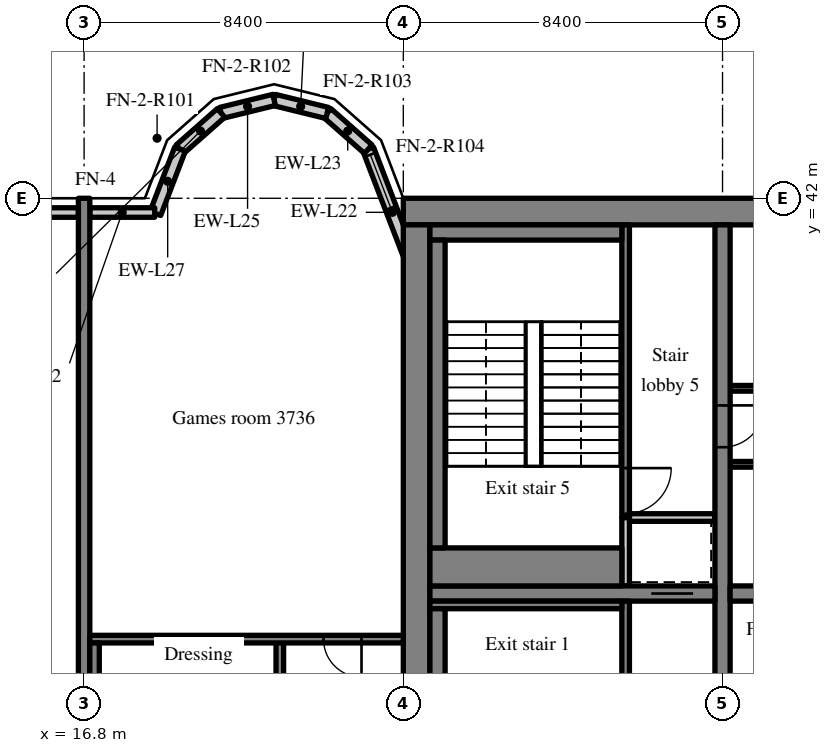
"""IFC4 building model, lengths in metres.
Left out: names, types, materials, properties, quantities, classifications, styles, units other than length and angle.
Written with IfcOpenShell. Run it as: python <this file> out.ifc"""

import sys

from ifc_helpers import new_model, si_unit, direction, frame, frame_2d, origin, place, context, subcontext, project, spatial, rectangle, extrude, source, transform, mapped, element, fill, save


model = new_model("IFC4")
c1 = context("Model", 3, precision=1e-05, world=origin(), true_north=direction((0.0, 1.0)))
c2 = subcontext(c1, "Body", "Model", "MODEL_VIEW")
j1 = project(units=[si_unit("LENGTHUNIT", "METRE"), si_unit("PLANEANGLEUNIT", "RADIAN")], contexts=[c1])
p1 = place(None, origin())
s1 = spatial("IfcSite", under=j1, at=p1, CompositionType="ELEMENT")
p2 = place(p1, origin())
s2 = spatial("IfcBuilding", under=s1, at=p2, CompositionType="ELEMENT")
p3 = place(p2, frame((0.0, 0.0, 155.4)))
s3 = spatial("IfcBuildingStorey", under=s2, at=p3, CompositionType="ELEMENT", Elevation=155.4)
m1 = source(origin(), c2, "Body", "SweptSolid", [
    extrude(rectangle(XDim=50.4, YDim=0.7, at=frame_2d((25.2, 0.0))), origin(), (0.0, 0.0, 1.0), 3.52),
])
p4 = place(p3, frame((25.2, 41.65, 0.0), z_axis=(0.0, 0.0, 1.0), x_axis=(1.0, 0.0, 0.0)))
e1 = element("IfcWall", 1, at=p4, inside=s3, PredefinedType="SHEAR", context=c2, shape_type="MappedRepresentation", body=[
    mapped(m1, transform((0.0, 0.0, 0.0), scale=1.0)),
])
m2 = source(origin(), c2, "Body", "SweptSolid", [
    extrude(rectangle(XDim=18.6, YDim=0.7, at=frame_2d((9.3, 0.0))), origin(), (0.0, 0.0, 1.0), 3.52),
])
p5 = place(p3, frame((25.55, 22.7, 0.0), z_axis=(0.0, 0.0, 1.0), x_axis=(0.0, 1.0, 0.0)))
e2 = element("IfcWall", 2, at=p5, inside=s3, PredefinedType="SHEAR", context=c2, shape_type="MappedRepresentation", body=[
    mapped(m2, transform((0.0, 0.0, 0.0), scale=1.0)),
])
m3 = source(origin(), c2, "Body", "SweptSolid", [
    extrude(rectangle(XDim=18.6, YDim=0.4, at=frame_2d((9.3, 0.0))), origin(), (0.0, 0.0, 1.0), 3.52),
])
p6 = place(p3, frame((33.6, 22.7, 0.0), z_axis=(0.0, 0.0, 1.0), x_axis=(0.0, 1.0, 0.0)))
e3 = element("IfcWall", 3, at=p6, inside=s3, PredefinedType="SHEAR", context=c2, shape_type="MappedRepresentation", body=[
    mapped(m3, transform((0.0, 0.0, 0.0), scale=1.0)),
])
m4 = source(origin(), c2, "Body", "SweptSolid", [
    extrude(rectangle(XDim=1.1, YDim=2.1, at=frame_2d((0.55, 1.05))), frame((0.0, 0.21, 0.0), z_axis=(0.0, -1.0, 0.0), x_axis=(1.0, 0.0, 0.0)), (0.0, 0.0, 1.0), 0.42),
])
p7 = place(p6, frame((12.75, 0.0, 0.0)))
e4 = element("IfcOpeningElement", 4, at=p7, cuts=e3, PredefinedType="OPENING", context=c2, shape_type="MappedRepresentation", body=[
    mapped(m4, transform((0.0, 0.0, 0.0), scale=1.0)),
])
m5 = source(origin(), c2, "Body", "SweptSolid", [
    extrude(rectangle(XDim=7.5, YDim=0.4, at=frame_2d((3.75, 0.0))), origin(), (0.0, 0.0, 1.0), 3.52),
])
p8 = place(p3, frame((25.9, 31.6, 0.0), z_axis=(0.0, 0.0, 1.0), x_axis=(1.0, 0.0, 0.0)))
e5 = element("IfcWall", 5, at=p8, inside=s3, PredefinedType="SHEAR", context=c2, shape_type="MappedRepresentation", body=[
    mapped(m5, transform((0.0, 0.0, 0.0), scale=1.0)),
])
p9 = place(p8, frame((5.825, 0.0, 0.0)))
e6 = element("IfcOpeningElement", 6, at=p9, cuts=e5, PredefinedType="OPENING", context=c2, shape_type="MappedRepresentation", body=[
    mapped(m4, transform((0.0, 0.0, 0.0), scale=1.0)),
])
m6 = source(origin(), c2, "Body", "SweptSolid", [
    extrude(rectangle(XDim=16.4, YDim=0.4, at=frame_2d((8.2, 0.0))), origin(), (0.0, 0.0, 1.0), 3.52),
])
p10 = place(p3, frame((33.8, 31.6, 0.0), z_axis=(0.0, 0.0, 1.0), x_axis=(1.0, 0.0, 0.0)))
e7 = element("IfcWall", 7, at=p10, inside=s3, PredefinedType="SHEAR", context=c2, shape_type="MappedRepresentation", body=[
    mapped(m6, transform((0.0, 0.0, 0.0), scale=1.0)),
])
m7 = source(origin(), c2, "Body", "SweptSolid", [
    extrude(rectangle(XDim=1.0, YDim=2.1, at=frame_2d((0.5, 1.05))), frame((0.0, 0.21, 0.0), z_axis=(0.0, -1.0, 0.0), x_axis=(1.0, 0.0, 0.0)), (0.0, 0.0, 1.0), 0.42),
])
p11 = place(p10, frame((14.8, 0.0, 0.0)))
e8 = element("IfcOpeningElement", 8, at=p11, cuts=e7, PredefinedType="OPENING", context=c2, shape_type="MappedRepresentation", body=[
    mapped(m7, transform((0.0, 0.0, 0.0), scale=1.0)),
])
m8 = source(origin(), c2, "Body", "SweptSolid", [
    extrude(rectangle(XDim=20.0, YDim=0.3, at=frame_2d((10.0, 0.0))), origin(), (0.0, 0.0, 1.0), 3.52),
])
p12 = place(p3, frame((16.8, 22.0, 0.0), z_axis=(0.0, 0.0, 1.0), x_axis=(0.0, 1.0, 0.0)))
e9 = element("IfcWall", 9, at=p12, inside=s3, PredefinedType="SHEAR", context=c2, shape_type="MappedRepresentation", body=[
    mapped(m8, transform((0.0, 0.0, 0.0), scale=1.0)),
])
m9 = source(origin(), c2, "Body", "SweptSolid", [
    extrude(rectangle(XDim=3.559, YDim=0.3, at=frame_2d((1.78, 0.0))), origin(), (0.0, 0.0, 1.0), 3.52),
])
p13 = place(p3, frame((25.55, 39.969, 0.0), z_axis=(0.0, 0.0, 1.0), x_axis=(-0.35779745313, 0.933799219604, 0.0)))
e10 = element("IfcWall", 10, at=p13, inside=s3, PredefinedType="SOLIDWALL", context=c2, shape_type="MappedRepresentation", body=[
    mapped(m9, transform((0.0, 0.0, 0.0), scale=1.0)),
])
m10 = source(origin(), c2, "Body", "SweptSolid", [
    extrude(rectangle(XDim=1.5, YDim=2.0, at=frame_2d((0.75, 1.0))), frame((0.0, 0.16, 0.0), z_axis=(0.0, -1.0, 0.0), x_axis=(1.0, 0.0, 0.0)), (0.0, 0.0, 1.0), 0.32),
])
p14 = place(p13, frame((1.903, 0.0, 0.9)))
e11 = element("IfcOpeningElement", 11, at=p14, cuts=e10, PredefinedType="OPENING", context=c2, shape_type="MappedRepresentation", body=[
    mapped(m10, transform((0.0, 0.0, 0.0), scale=1.0)),
])
m11 = source(origin(), c2, "Body", "SweptSolid", [
    extrude(rectangle(XDim=1.44, YDim=0.3, at=frame_2d((0.72, 0.0))), origin(), (0.0, 0.0, 1.0), 3.52),
])
p15 = place(p3, frame((24.277, 43.292, 0.0), z_axis=(0.0, 0.0, 1.0), x_axis=(-0.749649827867, 0.661834673902, 0.0)))
e12 = element("IfcWall", 12, at=p15, inside=s3, PredefinedType="SOLIDWALL", context=c2, shape_type="MappedRepresentation", body=[
    mapped(m11, transform((0.0, 0.0, 0.0), scale=1.0)),
])
m12 = source(origin(), c2, "Body", "SweptSolid", [
    extrude(rectangle(XDim=1.438, YDim=0.3, at=frame_2d((0.719, 0.0))), origin(), (0.0, 0.0, 1.0), 3.52),
])
p16 = place(p3, frame((23.197, 44.245, 0.0), z_axis=(0.0, 0.0, 1.0), x_axis=(-0.971152283879, 0.238460146601, 0.0)))
e13 = element("IfcWall", 13, at=p16, inside=s3, PredefinedType="SOLIDWALL", context=c2, shape_type="MappedRepresentation", body=[
    mapped(m12, transform((0.0, 0.0, 0.0), scale=1.0)),
])
m13 = source(origin(), c2, "Body", "SweptSolid", [
    extrude(rectangle(XDim=1.439, YDim=0.3, at=frame_2d((0.719, 0.0))), origin(), (0.0, 0.0, 1.0), 3.52),
])
p17 = place(p3, frame((21.8, 44.588, 0.0), z_axis=(0.0, 0.0, 1.0), x_axis=(-0.971161932466, -0.238420848351, 0.0)))
e14 = element("IfcWall", 14, at=p17, inside=s3, PredefinedType="SOLIDWALL", context=c2, shape_type="MappedRepresentation", body=[
    mapped(m13, transform((0.0, 0.0, 0.0), scale=1.0)),
])
m14 = source(origin(), c2, "Body", "SweptSolid", [
    extrude(rectangle(XDim=1.44, YDim=0.3, at=frame_2d((0.72, 0.0))), origin(), (0.0, 0.0, 1.0), 3.52),
])
p18 = place(p3, frame((20.403, 44.245, 0.0), z_axis=(0.0, 0.0, 1.0), x_axis=(-0.74957555648, -0.661918790432, 0.0)))
e15 = element("IfcWall", 15, at=p18, inside=s3, PredefinedType="SOLIDWALL", context=c2, shape_type="MappedRepresentation", body=[
    mapped(m14, transform((0.0, 0.0, 0.0), scale=1.0)),
])
m15 = source(origin(), c2, "Body", "SweptSolid", [
    extrude(rectangle(XDim=1.812, YDim=0.3, at=frame_2d((0.906, 0.0))), origin(), (0.0, 0.0, 1.0), 3.52),
])
p19 = place(p3, frame((19.323, 43.292, 0.0), z_axis=(0.0, 0.0, 1.0), x_axis=(-0.357877270961, -0.93376863244, 0.0)))
e16 = element("IfcWall", 16, at=p19, inside=s3, PredefinedType="SOLIDWALL", context=c2, shape_type="MappedRepresentation", body=[
    mapped(m15, transform((0.0, 0.0, 0.0), scale=1.0)),
])
m16 = source(origin(), c2, "Body", "SweptSolid", [
    extrude(rectangle(XDim=4.094, YDim=0.25, at=frame_2d((2.047, 0.0))), origin(), (0.0, 0.0, 1.0), 2.87),
])
p20 = place(p3, frame((16.65, 41.625, 0.0), z_axis=(0.0, 0.0, 1.0), x_axis=(-1.0, 0.0, 0.0)))
e17 = element("IfcWall", 17, at=p20, inside=s3, PredefinedType="SOLIDWALL", context=c2, shape_type="MappedRepresentation", body=[
    mapped(m16, transform((0.0, 0.0, 0.0), scale=1.0)),
])
m17 = source(origin(), c2, "Body", "SweptSolid", [
    extrude(rectangle(XDim=1.5, YDim=1.5, at=frame_2d((0.75, 0.75))), frame((0.0, 0.135, 0.0), z_axis=(0.0, -1.0, 0.0), x_axis=(1.0, 0.0, 0.0)), (0.0, 0.0, 1.0), 0.27),
])
p21 = place(p20, frame((1.297, 0.0, 0.9)))
e18 = element("IfcOpeningElement", 18, at=p21, cuts=e17, PredefinedType="OPENING", context=c2, shape_type="MappedRepresentation", body=[
    mapped(m17, transform((0.0, 0.0, 0.0), scale=1.0)),
])
m18 = source(origin(), c2, "Body", "SweptSolid", [
    extrude(rectangle(XDim=1.708, YDim=0.25, at=frame_2d((0.854, 0.0))), origin(), (0.0, 0.0, 1.0), 2.87),
])
p22 = place(p3, frame((18.658, 41.625, 0.0), z_axis=(0.0, 0.0, 1.0), x_axis=(-1.0, 0.0, 0.0)))
e19 = element("IfcWall", 19, at=p22, inside=s3, PredefinedType="SOLIDWALL", context=c2, shape_type="MappedRepresentation", body=[
    mapped(m18, transform((0.0, 0.0, 0.0), scale=1.0)),
])
m19 = source(origin(), c2, "Body", "SweptSolid", [
    extrude(rectangle(XDim=14.2, YDim=0.15, at=frame_2d((7.1, 0.0))), origin(), (0.0, 0.0, 1.0), 3.52),
])
p23 = place(p3, frame((33.8, 35.0, 0.0), z_axis=(0.0, 0.0, 1.0), x_axis=(1.0, 0.0, 0.0)))
e20 = element("IfcWall", 20, at=p23, inside=s3, PredefinedType="PARTITIONING", context=c2, shape_type="MappedRepresentation", body=[
    mapped(m19, transform((0.0, 0.0, 0.0), scale=1.0)),
])
m20 = source(origin(), c2, "Body", "SweptSolid", [
    extrude(rectangle(XDim=0.9, YDim=2.1, at=frame_2d((0.45, 1.05))), frame((0.0, 0.085, 0.0), z_axis=(0.0, -1.0, 0.0), x_axis=(1.0, 0.0, 0.0)), (0.0, 0.0, 1.0), 0.17),
])
p24 = place(p23, frame((6.612, 0.0, 0.0)))
e21 = element("IfcOpeningElement", 21, at=p24, cuts=e20, PredefinedType="OPENING", context=c2, shape_type="MappedRepresentation", body=[
    mapped(m20, transform((0.0, 0.0, 0.0), scale=1.0)),
])
m21 = source(origin(), c2, "Body", "SweptSolid", [
    extrude(rectangle(XDim=16.4, YDim=0.15, at=frame_2d((8.2, 0.0))), origin(), (0.0, 0.0, 1.0), 3.52),
])
p25 = place(p3, frame((33.8, 37.0, 0.0), z_axis=(0.0, 0.0, 1.0), x_axis=(1.0, 0.0, 0.0)))
e22 = element("IfcWall", 22, at=p25, inside=s3, PredefinedType="PARTITIONING", context=c2, shape_type="MappedRepresentation", body=[
    mapped(m21, transform((0.0, 0.0, 0.0), scale=1.0)),
])
p26 = place(p25, frame((0.78, 0.0, 0.0)))
e23 = element("IfcOpeningElement", 23, at=p26, cuts=e22, PredefinedType="OPENING", context=c2, shape_type="MappedRepresentation", body=[
    mapped(m20, transform((0.0, 0.0, 0.0), scale=1.0)),
])
p27 = place(p25, frame((3.65, 0.0, 0.0)))
e24 = element("IfcOpeningElement", 24, at=p27, cuts=e22, PredefinedType="OPENING", context=c2, shape_type="MappedRepresentation", body=[
    mapped(m20, transform((0.0, 0.0, 0.0), scale=1.0)),
])
p28 = place(p25, frame((9.39, 0.0, 0.0)))
e25 = element("IfcOpeningElement", 25, at=p28, cuts=e22, PredefinedType="OPENING", context=c2, shape_type="MappedRepresentation", body=[
    mapped(m20, transform((0.0, 0.0, 0.0), scale=1.0)),
])
p29 = place(p25, frame((14.72, 0.0, 0.0)))
e26 = element("IfcOpeningElement", 26, at=p29, cuts=e22, PredefinedType="OPENING", context=c2, shape_type="MappedRepresentation", body=[
    mapped(m20, transform((0.0, 0.0, 0.0), scale=1.0)),
])
m22 = source(origin(), c2, "Body", "SweptSolid", [
    extrude(rectangle(XDim=8.7, YDim=0.2, at=frame_2d((4.35, 0.0))), origin(), (0.0, 0.0, 1.0), 3.52),
])
p30 = place(p3, frame((31.05, 22.7, 0.0), z_axis=(0.0, 0.0, 1.0), x_axis=(0.0, 1.0, 0.0)))
e27 = element("IfcWall", 27, at=p30, inside=s3, PredefinedType="SOLIDWALL", context=c2, shape_type="MappedRepresentation", body=[
    mapped(m22, transform((0.0, 0.0, 0.0), scale=1.0)),
])
m23 = source(origin(), c2, "Body", "SweptSolid", [
    extrude(rectangle(XDim=1.2, YDim=2.1, at=frame_2d((0.6, 1.05))), frame((0.0, 0.11, 0.0), z_axis=(0.0, -1.0, 0.0), x_axis=(1.0, 0.0, 0.0)), (0.0, 0.0, 1.0), 0.22),
])
p31 = place(p30, frame((0.9, 0.0, 0.0)))
e28 = element("IfcOpeningElement", 28, at=p31, cuts=e27, PredefinedType="OPENING", context=c2, shape_type="MappedRepresentation", body=[
    mapped(m23, transform((0.0, 0.0, 0.0), scale=1.0)),
])
m24 = source(origin(), c2, "Body", "SweptSolid", [
    extrude(rectangle(XDim=1.8, YDim=0.2, at=frame_2d((0.9, 0.0))), origin(), (0.0, 0.0, 1.0), 3.52),
])
p32 = place(p3, frame((31.05, 31.8, 0.0), z_axis=(0.0, 0.0, 1.0), x_axis=(0.0, 1.0, 0.0)))
e29 = element("IfcWall", 29, at=p32, inside=s3, PredefinedType="SOLIDWALL", context=c2, shape_type="MappedRepresentation", body=[
    mapped(m24, transform((0.0, 0.0, 0.0), scale=1.0)),
])
m25 = source(origin(), c2, "Body", "SweptSolid", [
    extrude(rectangle(XDim=2.25, YDim=0.2, at=frame_2d((1.125, 0.0))), origin(), (0.0, 0.0, 1.0), 3.52),
])
p33 = place(p3, frame((31.15, 33.6, 0.0), z_axis=(0.0, 0.0, 1.0), x_axis=(1.0, 0.0, 0.0)))
e30 = element("IfcWall", 30, at=p33, inside=s3, PredefinedType="SOLIDWALL", context=c2, shape_type="MappedRepresentation", body=[
    mapped(m25, transform((0.0, 0.0, 0.0), scale=1.0)),
])
m26 = source(origin(), c2, "Body", "SweptSolid", [
    extrude(rectangle(XDim=7.7, YDim=0.2, at=frame_2d((3.85, 0.0))), origin(), (0.0, 0.0, 1.0), 3.52),
])
p34 = place(p3, frame((31.05, 33.6, 0.0), z_axis=(0.0, 0.0, 1.0), x_axis=(0.0, 1.0, 0.0)))
e31 = element("IfcWall", 31, at=p34, inside=s3, PredefinedType="SOLIDWALL", context=c2, shape_type="MappedRepresentation", body=[
    mapped(m26, transform((0.0, 0.0, 0.0), scale=1.0)),
])
p35 = place(p34, frame((0.1, 0.0, 0.0)))
e32 = element("IfcOpeningElement", 32, at=p35, cuts=e31, PredefinedType="OPENING", context=c2, shape_type="MappedRepresentation", body=[
    mapped(m23, transform((0.0, 0.0, 0.0), scale=1.0)),
])
m27 = source(origin(), c2, "Body", "SweptSolid", [
    extrude(rectangle(XDim=8.3, YDim=0.2, at=frame_2d((4.15, 0.0))), origin(), (0.0, 0.0, 1.0), 3.52),
])
p36 = place(p3, frame((21.95, 22.1, 0.0), z_axis=(0.0, 0.0, 1.0), x_axis=(0.0, 1.0, 0.0)))
e33 = element("IfcWall", 33, at=p36, inside=s3, PredefinedType="SOLIDWALL", context=c2, shape_type="MappedRepresentation", body=[
    mapped(m27, transform((0.0, 0.0, 0.0), scale=1.0)),
])
p37 = place(p36, frame((0.6, 0.0, 0.0)))
e34 = element("IfcOpeningElement", 34, at=p37, cuts=e33, PredefinedType="OPENING", context=c2, shape_type="MappedRepresentation", body=[
    mapped(m23, transform((0.0, 0.0, 0.0), scale=1.0)),
])
m28 = source(origin(), c2, "Body", "SweptSolid", [
    extrude(rectangle(XDim=8.25, YDim=0.2, at=frame_2d((4.125, 0.0))), origin(), (0.0, 0.0, 1.0), 3.52),
])
p38 = place(p3, frame((16.95, 30.4, 0.0), z_axis=(0.0, 0.0, 1.0), x_axis=(1.0, 0.0, 0.0)))
e35 = element("IfcWall", 35, at=p38, inside=s3, PredefinedType="SOLIDWALL", context=c2, shape_type="MappedRepresentation", body=[
    mapped(m28, transform((0.0, 0.0, 0.0), scale=1.0)),
])
m29 = source(origin(), c2, "Body", "SweptSolid", [
    extrude(rectangle(XDim=1.0, YDim=2.1, at=frame_2d((0.5, 1.05))), frame((0.0, 0.11, 0.0), z_axis=(0.0, -1.0, 0.0), x_axis=(1.0, 0.0, 0.0)), (0.0, 0.0, 1.0), 0.22),
])
p39 = place(p38, frame((6.15, 0.0, 0.0)))
e36 = element("IfcOpeningElement", 36, at=p39, cuts=e35, PredefinedType="OPENING", context=c2, shape_type="MappedRepresentation", body=[
    mapped(m29, transform((0.0, 0.0, 0.0), scale=1.0)),
])
m30 = source(origin(), c2, "Body", "SweptSolid", [
    extrude(rectangle(XDim=5.05, YDim=0.2, at=frame_2d((2.525, 0.0))), origin(), (0.0, 0.0, 1.0), 3.52),
])
p40 = place(p3, frame((25.9, 31.3, 0.0), z_axis=(0.0, 0.0, 1.0), x_axis=(1.0, 0.0, 0.0)))
e37 = element("IfcWall", 37, at=p40, inside=s3, PredefinedType="SOLIDWALL", context=c2, shape_type="MappedRepresentation", body=[
    mapped(m30, transform((0.0, 0.0, 0.0), scale=1.0)),
])
m31 = source(origin(), c2, "Body", "SweptSolid", [
    extrude(rectangle(XDim=8.1, YDim=0.4, at=frame_2d((4.05, 0.0))), origin(), (0.0, 0.0, 1.0), 3.52),
])
p41 = place(p3, frame((26.1, 23.1, 0.0), z_axis=(0.0, 0.0, 1.0), x_axis=(0.0, 1.0, 0.0)))
e38 = element("IfcWall", 38, at=p41, inside=s3, PredefinedType="SOLIDWALL", context=c2, shape_type="MappedRepresentation", body=[
    mapped(m31, transform((0.0, 0.0, 0.0), scale=1.0)),
])
m32 = source(origin(), c2, "Body", "SweptSolid", [
    extrude(rectangle(XDim=8.1, YDim=0.25, at=frame_2d((4.05, 0.0))), origin(), (0.0, 0.0, 1.0), 3.52),
])
p42 = place(p3, frame((17.075, 22.2, 0.0), z_axis=(0.0, 0.0, 1.0), x_axis=(0.0, 1.0, 0.0)))
e39 = element("IfcWall", 39, at=p42, inside=s3, PredefinedType="SOLIDWALL", context=c2, shape_type="MappedRepresentation", body=[
    mapped(m32, transform((0.0, 0.0, 0.0), scale=1.0)),
])
m33 = source(origin(), c2, "Body", "SweptSolid", [
    extrude(rectangle(XDim=5.05, YDim=0.4, at=frame_2d((2.525, 0.0))), origin(), (0.0, 0.0, 1.0), 3.52),
])
p43 = place(p3, frame((25.9, 41.1, 0.0), z_axis=(0.0, 0.0, 1.0), x_axis=(1.0, 0.0, 0.0)))
e40 = element("IfcWall", 40, at=p43, inside=s3, PredefinedType="SOLIDWALL", context=c2, shape_type="MappedRepresentation", body=[
    mapped(m33, transform((0.0, 0.0, 0.0), scale=1.0)),
])
m34 = source(origin(), c2, "Body", "SweptSolid", [
    extrude(rectangle(XDim=5.05, YDim=1.0, at=frame_2d((2.525, 0.0))), origin(), (0.0, 0.0, 1.0), 3.52),
])
p44 = place(p3, frame((25.9, 32.3, 0.0), z_axis=(0.0, 0.0, 1.0), x_axis=(1.0, 0.0, 0.0)))
e41 = element("IfcWall", 41, at=p44, inside=s3, PredefinedType="SOLIDWALL", context=c2, shape_type="MappedRepresentation", body=[
    mapped(m34, transform((0.0, 0.0, 0.0), scale=1.0)),
])
p45 = place(p3, frame((26.1, 32.8, 0.0), z_axis=(0.0, 0.0, 1.0), x_axis=(0.0, 1.0, 0.0)))
e42 = element("IfcWall", 42, at=p45, inside=s3, PredefinedType="SOLIDWALL", context=c2, shape_type="MappedRepresentation", body=[
    mapped(m31, transform((0.0, 0.0, 0.0), scale=1.0)),
])
m35 = source(origin(), c2, "Body", "SweptSolid", [
    extrude(rectangle(XDim=1.5, YDim=2.0, at=frame_2d((0.75, 1.0))), frame((0.0, 0.03, 0.0), z_axis=(0.0, -1.0, 0.0), x_axis=(1.0, 0.0, 0.0)), (0.0, 0.0, 1.0), 0.06),
])
p46 = place(p14, origin())
e43 = element("IfcWindow", 43, at=p46, inside=s3, PartitioningType="SINGLE_PANEL", PredefinedType="WINDOW", context=c2, shape_type="MappedRepresentation", body=[
    mapped(m35, transform((0.0, 0.0, 0.0), scale=1.0)),
])
fill(e11, e43)
m36 = source(origin(), c2, "Body", "SweptSolid", [
    extrude(rectangle(XDim=1.1, YDim=2.1, at=frame_2d((0.55, 1.05))), frame((0.0, 0.025, 0.0), z_axis=(0.0, -1.0, 0.0), x_axis=(1.0, 0.0, 0.0)), (0.0, 0.0, 1.0), 0.05),
])
p47 = place(p9, origin())
e44 = element("IfcDoor", 44, at=p47, inside=s3, OperationType="SLIDING_TO_RIGHT", PredefinedType="DOOR", context=c2, shape_type="MappedRepresentation", body=[
    mapped(m36, transform((0.0, 0.0, 0.0), scale=1.0)),
])
fill(e6, e44)
m37 = source(origin(), c2, "Body", "SweptSolid", [
    extrude(rectangle(XDim=1.2, YDim=2.1, at=frame_2d((0.6, 1.05))), frame((0.0, 0.025, 0.0), z_axis=(0.0, -1.0, 0.0), x_axis=(1.0, 0.0, 0.0)), (0.0, 0.0, 1.0), 0.05),
])
p48 = place(p35, origin())
e45 = element("IfcDoor", 45, at=p48, inside=s3, OperationType="SINGLE_SWING_RIGHT", PredefinedType="DOOR", context=c2, shape_type="MappedRepresentation", body=[
    mapped(m37, transform((0.0, 0.0, 0.0), scale=1.0)),
])
fill(e32, e45)
m38 = source(origin(), c2, "Body", "SweptSolid", [
    extrude(rectangle(XDim=1.0, YDim=2.1, at=frame_2d((0.5, 1.05))), frame((0.0, 0.025, 0.0), z_axis=(0.0, -1.0, 0.0), x_axis=(1.0, 0.0, 0.0)), (0.0, 0.0, 1.0), 0.05),
])
p49 = place(p39, origin())
e46 = element("IfcDoor", 46, at=p49, inside=s3, OperationType="SINGLE_SWING_RIGHT", PredefinedType="DOOR", context=c2, shape_type="MappedRepresentation", body=[
    mapped(m38, transform((0.0, 0.0, 0.0), scale=1.0)),
])
fill(e36, e46)
p50 = place(p7, origin())
e47 = element("IfcDoor", 47, at=p50, inside=s3, OperationType="SINGLE_SWING_RIGHT", PredefinedType="DOOR", context=c2, shape_type="MappedRepresentation", body=[
    mapped(m36, transform((0.0, 0.0, 0.0), scale=1.0)),
])
fill(e4, e47)
save(model, sys.argv[1])
